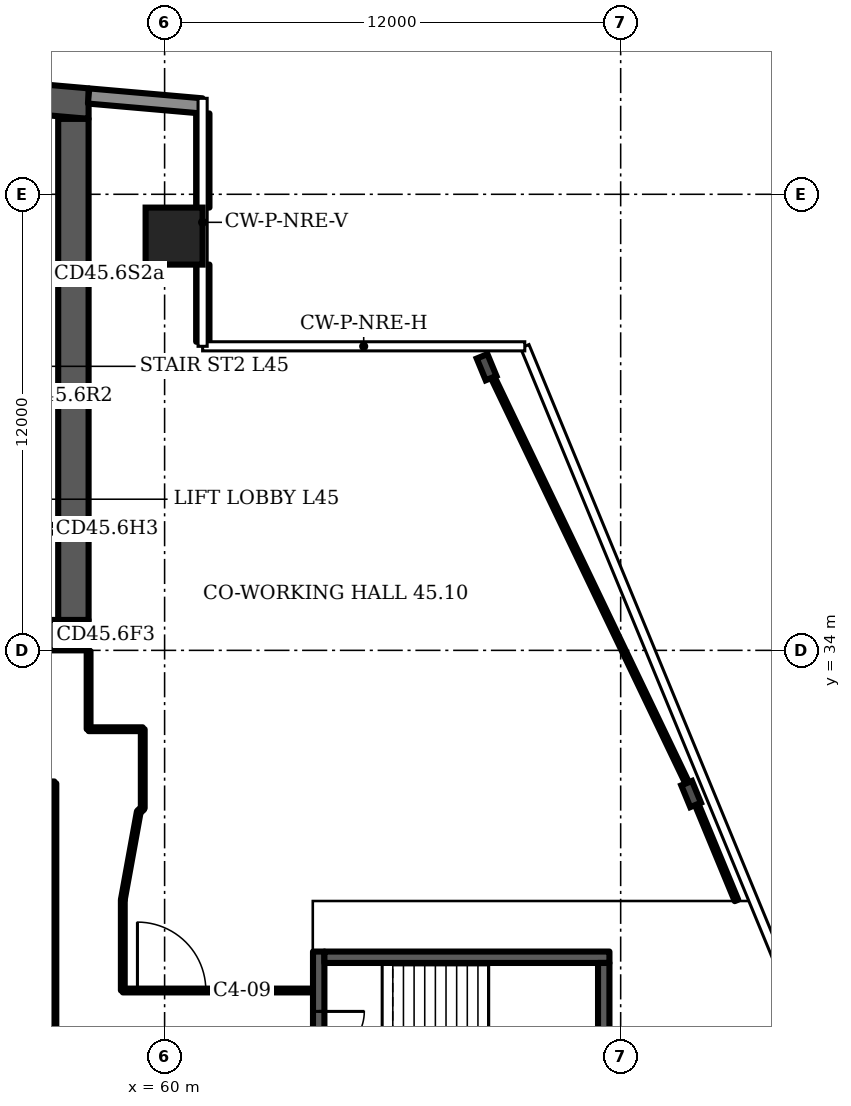
"""IFC4 building model, lengths in metres.
Left out: names, types, materials, properties, quantities, classifications, styles, units other than length and angle.
Written with IfcOpenShell. Run it as: python <this file> out.ifc"""

import sys

from ifc_helpers import new_model, si_unit, direction, frame, frame_2d, origin, origin_2d, place, context, subcontext, project, spatial, polyline, rectangle, i_section, outline, extrude, element, fill, save


model = new_model("IFC4")
c1 = context("Model", 3, precision=1e-05, world=origin(), true_north=direction((0.0, 1.0)))
c2 = subcontext(c1, "Body", "Model", "MODEL_VIEW")
j1 = project(units=[si_unit("LENGTHUNIT", "METRE"), si_unit("PLANEANGLEUNIT", "RADIAN")], contexts=[c1])
p1 = place(None, origin())
s1 = spatial("IfcSite", under=j1, at=p1, CompositionType="ELEMENT")
p2 = place(p1, origin())
s2 = spatial("IfcBuilding", under=s1, at=p2, CompositionType="ELEMENT")
p3 = place(p2, frame((0.0, 0.0, 184.3)))
s3 = spatial("IfcBuildingStorey", under=s2, at=p3, CompositionType="ELEMENT", Elevation=184.3)
p4 = place(p3, frame((0.0, 0.0, -0.0)))
e1 = element("IfcWall", 1, at=p4, inside=s3, PredefinedType="SHEAR", context=c2, shape_type="SweptSolid", body=[
    extrude(outline(polyline([(16.0, 47.984), (37.0, 49.822), (58.0, 47.984), (58.0, 48.787), (37.0, 50.625), (16.0, 48.787), (16.0, 47.984)])), origin(), (0.0, 0.0, 1.0), 3.6),
])
p5 = place(p3, frame((16.0, 34.4, 0.0), z_axis=(0.0, 0.0, 1.0), x_axis=(1.0, 0.0, 0.0)))
e2 = element("IfcWall", 2, at=p5, inside=s3, PredefinedType="SHEAR", context=c2, shape_type="SweptSolid", body=[
    extrude(rectangle(XDim=42.0, YDim=0.8, at=frame_2d((21.0, 0.0))), origin(), (0.0, 0.0, 1.0), 3.6),
])
p6 = place(p5, frame((1.75, 0.0, 0.0)))
e3 = element("IfcOpeningElement", 3, at=p6, cuts=e2, PredefinedType="OPENING", context=c2, shape_type="SweptSolid", body=[
    extrude(rectangle(XDim=1.0, YDim=2.1, at=frame_2d((0.5, 1.05))), frame((0.0, 0.41, 0.0), z_axis=(0.0, -1.0, 0.0), x_axis=(1.0, 0.0, 0.0)), (0.0, 0.0, 1.0), 0.82),
])
p7 = place(p5, frame((4.65, 0.0, 0.0)))
e4 = element("IfcOpeningElement", 4, at=p7, cuts=e2, PredefinedType="OPENING", context=c2, shape_type="SweptSolid", body=[
    extrude(rectangle(XDim=1.0, YDim=2.1, at=frame_2d((0.5, 1.05))), frame((0.0, 0.41, 0.0), z_axis=(0.0, -1.0, 0.0), x_axis=(1.0, 0.0, 0.0)), (0.0, 0.0, 1.0), 0.82),
])
p8 = place(p5, frame((7.65, 0.0, 0.0)))
e5 = element("IfcOpeningElement", 5, at=p8, cuts=e2, PredefinedType="OPENING", context=c2, shape_type="SweptSolid", body=[
    extrude(rectangle(XDim=1.2, YDim=2.1, at=frame_2d((0.6, 1.05))), frame((0.0, 0.41, 0.0), z_axis=(0.0, -1.0, 0.0), x_axis=(1.0, 0.0, 0.0)), (0.0, 0.0, 1.0), 0.82),
])
p9 = place(p5, frame((14.767, 0.0, 0.0)))
e6 = element("IfcOpeningElement", 6, at=p9, cuts=e2, PredefinedType="OPENING", context=c2, shape_type="SweptSolid", body=[
    extrude(rectangle(XDim=1.1, YDim=2.1, at=frame_2d((0.55, 1.05))), frame((0.0, 0.41, 0.0), z_axis=(0.0, -1.0, 0.0), x_axis=(1.0, 0.0, 0.0)), (0.0, 0.0, 1.0), 0.82),
])
p10 = place(p5, frame((19.133, 0.0, 0.0)))
e7 = element("IfcOpeningElement", 7, at=p10, cuts=e2, PredefinedType="OPENING", context=c2, shape_type="SweptSolid", body=[
    extrude(rectangle(XDim=1.1, YDim=2.1, at=frame_2d((0.55, 1.05))), frame((0.0, 0.41, 0.0), z_axis=(0.0, -1.0, 0.0), x_axis=(1.0, 0.0, 0.0)), (0.0, 0.0, 1.0), 0.82),
])
p11 = place(p5, frame((16.8, 0.0, 0.0)))
e8 = element("IfcOpeningElement", 8, at=p11, cuts=e2, PredefinedType="OPENING", context=c2, shape_type="SweptSolid", body=[
    extrude(rectangle(XDim=1.4, YDim=2.1, at=frame_2d((0.7, 1.05))), frame((0.0, 0.41, 0.0), z_axis=(0.0, -1.0, 0.0), x_axis=(1.0, 0.0, 0.0)), (0.0, 0.0, 1.0), 0.82),
])
p12 = place(p5, frame((21.767, 0.0, 0.0)))
e9 = element("IfcOpeningElement", 9, at=p12, cuts=e2, PredefinedType="OPENING", context=c2, shape_type="SweptSolid", body=[
    extrude(rectangle(XDim=1.1, YDim=2.1, at=frame_2d((0.55, 1.05))), frame((0.0, 0.41, 0.0), z_axis=(0.0, -1.0, 0.0), x_axis=(1.0, 0.0, 0.0)), (0.0, 0.0, 1.0), 0.82),
])
p13 = place(p5, frame((23.95, 0.0, 0.0)))
e10 = element("IfcOpeningElement", 10, at=p13, cuts=e2, PredefinedType="OPENING", context=c2, shape_type="SweptSolid", body=[
    extrude(rectangle(XDim=1.1, YDim=2.1, at=frame_2d((0.55, 1.05))), frame((0.0, 0.41, 0.0), z_axis=(0.0, -1.0, 0.0), x_axis=(1.0, 0.0, 0.0)), (0.0, 0.0, 1.0), 0.82),
])
p14 = place(p5, frame((26.133, 0.0, 0.0)))
e11 = element("IfcOpeningElement", 11, at=p14, cuts=e2, PredefinedType="OPENING", context=c2, shape_type="SweptSolid", body=[
    extrude(rectangle(XDim=1.1, YDim=2.1, at=frame_2d((0.55, 1.05))), frame((0.0, 0.41, 0.0), z_axis=(0.0, -1.0, 0.0), x_axis=(1.0, 0.0, 0.0)), (0.0, 0.0, 1.0), 0.82),
])
p15 = place(p5, frame((33.15, 0.0, 0.0)))
e12 = element("IfcOpeningElement", 12, at=p15, cuts=e2, PredefinedType="OPENING", context=c2, shape_type="SweptSolid", body=[
    extrude(rectangle(XDim=1.2, YDim=2.1, at=frame_2d((0.6, 1.05))), frame((0.0, 0.41, 0.0), z_axis=(0.0, -1.0, 0.0), x_axis=(1.0, 0.0, 0.0)), (0.0, 0.0, 1.0), 0.82),
])
p16 = place(p5, frame((35.817, 0.0, 0.0)))
e13 = element("IfcOpeningElement", 13, at=p16, cuts=e2, PredefinedType="OPENING", context=c2, shape_type="SweptSolid", body=[
    extrude(rectangle(XDim=1.0, YDim=2.1, at=frame_2d((0.5, 1.05))), frame((0.0, 0.41, 0.0), z_axis=(0.0, -1.0, 0.0), x_axis=(1.0, 0.0, 0.0)), (0.0, 0.0, 1.0), 0.82),
])
p17 = place(p5, frame((39.95, 0.0, 0.0)))
e14 = element("IfcOpeningElement", 14, at=p17, cuts=e2, PredefinedType="OPENING", context=c2, shape_type="SweptSolid", body=[
    extrude(rectangle(XDim=1.0, YDim=2.1, at=frame_2d((0.5, 1.05))), frame((0.0, 0.41, 0.0), z_axis=(0.0, -1.0, 0.0), x_axis=(1.0, 0.0, 0.0)), (0.0, 0.0, 1.0), 0.82),
])
p18 = place(p5, frame((37.767, 0.0, 0.0)))
e15 = element("IfcOpeningElement", 15, at=p18, cuts=e2, PredefinedType="OPENING", context=c2, shape_type="SweptSolid", body=[
    extrude(rectangle(XDim=1.4, YDim=2.1, at=frame_2d((0.7, 1.05))), frame((0.0, 0.41, 0.0), z_axis=(0.0, -1.0, 0.0), x_axis=(1.0, 0.0, 0.0)), (0.0, 0.0, 1.0), 0.82),
])
p19 = place(p3, frame((57.6, 34.8, 0.0), z_axis=(0.0, 0.0, 1.0), x_axis=(0.0, 1.0, 0.0)))
e16 = element("IfcWall", 16, at=p19, inside=s3, PredefinedType="SHEAR", context=c2, shape_type="SweptSolid", body=[
    extrude(rectangle(XDim=13.184, YDim=0.8, at=frame_2d((6.592, 0.0))), origin(), (0.0, 0.0, 1.0), 3.6),
])
p20 = place(p3, frame((60.25, 44.9, 0.0), z_axis=(0.0, 0.0, 1.0), x_axis=(1.0, 0.0, 0.0)))
e17 = element("IfcColumn", 17, at=p20, inside=s3, PredefinedType="COLUMN", context=c2, shape_type="SweptSolid", body=[
    extrude(rectangle(XDim=1.5, YDim=1.5, at=origin_2d()), origin(), (0.0, 0.0, 1.0), 3.6),
])
for number, where, z_axis, x_axis in (
    (18, (73.854, 30.219, 0.0), (0.0, 0.0, 1.0), (0.924, 0.382, 0.0)),
    (19, (68.472, 41.45, 0.0), (0.0, 0.0, 1.0), (0.924, 0.382, 0.0)),
):
    element("IfcColumn", number, at=place(p3, frame(where, z_axis=z_axis, x_axis=x_axis)), inside=s3, PredefinedType="COLUMN", context=c2, shape_type="SweptSolid", body=[
        extrude(i_section(OverallWidth=0.305, OverallDepth=0.62, WebThickness=0.021, FlangeThickness=0.04, FilletRadius=0.027, at=origin_2d()), origin(), (0.0, 0.0, 1.0), 3.6),
    ])
p21 = place(p3, frame((60.983, 48.326, 0.0), z_axis=(0.0, 0.0, 1.0), x_axis=(-0.996194, 0.087168, 0.0)))
e20 = element("IfcWall", 20, at=p21, inside=s3, PredefinedType="SOLIDWALL", context=c2, shape_type="SweptSolid", body=[
    extrude(rectangle(XDim=2.994, YDim=0.4, at=frame_2d((1.497, 0.0))), origin(), (0.0, 0.0, 1.0), 3.2),
])
p22 = place(p3, frame((61.005, 42.12, 0.0), z_axis=(0.0, 0.0, 1.0), x_axis=(0.0, 1.0, 0.0)))
e21 = element("IfcWall", 21, at=p22, inside=s3, PredefinedType="SOLIDWALL", context=c2, shape_type="SweptSolid", body=[
    extrude(rectangle(XDim=2.03, YDim=0.35, at=frame_2d((1.015, 0.0))), origin(), (0.0, 0.0, 1.0), 1.0),
])
p23 = place(p3, frame((61.005, 45.65, 0.0), z_axis=(0.0, 0.0, 1.0), x_axis=(0.0, 1.0, 0.0)))
e22 = element("IfcWall", 22, at=p23, inside=s3, PredefinedType="SOLIDWALL", context=c2, shape_type="SweptSolid", body=[
    extrude(rectangle(XDim=2.477, YDim=0.35, at=frame_2d((1.238, 0.0))), origin(), (0.0, 0.0, 1.0), 1.0),
])
p24 = place(p3, frame((55.7, 37.2, 0.0), z_axis=(0.0, 0.0, 1.0), x_axis=(1.0, 0.0, 0.0)))
e23 = element("IfcWall", 23, at=p24, inside=s3, PredefinedType="PARTITIONING", context=c2, shape_type="SweptSolid", body=[
    extrude(rectangle(XDim=1.5, YDim=0.2, at=frame_2d((0.75, 0.0))), origin(), (0.0, 0.0, 1.0), 3.2),
])
p25 = place(p24, frame((0.25, 0.0, 0.0)))
e24 = element("IfcOpeningElement", 24, at=p25, cuts=e23, PredefinedType="OPENING", context=c2, shape_type="SweptSolid", body=[
    extrude(rectangle(XDim=1.0, YDim=2.1, at=frame_2d((0.5, 1.05))), frame((0.0, 0.11, 0.0), z_axis=(0.0, -1.0, 0.0), x_axis=(1.0, 0.0, 0.0)), (0.0, 0.0, 1.0), 0.22),
])
p26 = place(p3, frame((51.4, 40.7, 0.0), z_axis=(0.0, 0.0, 1.0), x_axis=(1.0, 0.0, 0.0)))
e25 = element("IfcWall", 25, at=p26, inside=s3, PredefinedType="PARTITIONING", context=c2, shape_type="SweptSolid", body=[
    extrude(rectangle(XDim=5.8, YDim=0.2, at=frame_2d((2.9, 0.0))), origin(), (0.0, 0.0, 1.0), 3.2),
])
p27 = place(p26, frame((0.367, 0.0, 0.0)))
e26 = element("IfcOpeningElement", 26, at=p27, cuts=e25, PredefinedType="OPENING", context=c2, shape_type="SweptSolid", body=[
    extrude(rectangle(XDim=1.1, YDim=2.1, at=frame_2d((0.55, 1.05))), frame((0.0, 0.11, 0.0), z_axis=(0.0, -1.0, 0.0), x_axis=(1.0, 0.0, 0.0)), (0.0, 0.0, 1.0), 0.22),
])
p28 = place(p26, frame((3.417, 0.0, 0.0)))
e27 = element("IfcOpeningElement", 27, at=p28, cuts=e25, PredefinedType="OPENING", context=c2, shape_type="SweptSolid", body=[
    extrude(rectangle(XDim=1.0, YDim=2.1, at=frame_2d((0.5, 1.05))), frame((0.0, 0.11, 0.0), z_axis=(0.0, -1.0, 0.0), x_axis=(1.0, 0.0, 0.0)), (0.0, 0.0, 1.0), 0.22),
])
p29 = place(p3, frame((51.4, 43.9, 0.0), z_axis=(0.0, 0.0, 1.0), x_axis=(1.0, 0.0, 0.0)))
e28 = element("IfcWall", 28, at=p29, inside=s3, PredefinedType="PARTITIONING", context=c2, shape_type="SweptSolid", body=[
    extrude(rectangle(XDim=5.8, YDim=0.2, at=frame_2d((2.9, 0.0))), origin(), (0.0, 0.0, 1.0), 3.2),
])
p30 = place(p29, frame((2.617, 0.0, 0.0)))
e29 = element("IfcOpeningElement", 29, at=p30, cuts=e28, PredefinedType="OPENING", context=c2, shape_type="SweptSolid", body=[
    extrude(rectangle(XDim=1.0, YDim=2.1, at=frame_2d((0.5, 1.05))), frame((0.0, 0.11, 0.0), z_axis=(0.0, -1.0, 0.0), x_axis=(1.0, 0.0, 0.0)), (0.0, 0.0, 1.0), 0.22),
])
p31 = place(p29, frame((4.5, 0.0, 0.0)))
e30 = element("IfcOpeningElement", 30, at=p31, cuts=e28, PredefinedType="OPENING", context=c2, shape_type="SweptSolid", body=[
    extrude(rectangle(XDim=1.0, YDim=2.1, at=frame_2d((0.5, 1.05))), frame((0.0, 0.11, 0.0), z_axis=(0.0, -1.0, 0.0), x_axis=(1.0, 0.0, 0.0)), (0.0, 0.0, 1.0), 0.22),
])
p32 = place(p3, frame((64.055, 21.725, 0.0), z_axis=(0.0, 0.0, 1.0), x_axis=(0.0, 1.0, 0.0)))
e31 = element("IfcWall", 31, at=p32, inside=s3, PredefinedType="SHEAR", context=c2, shape_type="SweptSolid", body=[
    extrude(rectangle(XDim=4.35, YDim=0.3, at=frame_2d((2.175, 0.0))), origin(), (0.0, 0.0, 1.0), 3.2),
])
p33 = place(p32, frame((1.575, 0.0, 0.0)))
e32 = element("IfcOpeningElement", 32, at=p33, cuts=e31, PredefinedType="OPENING", context=c2, shape_type="SweptSolid", body=[
    extrude(rectangle(XDim=1.2, YDim=2.1, at=frame_2d((0.6, 1.05))), frame((0.0, 0.16, 0.0), z_axis=(0.0, -1.0, 0.0), x_axis=(1.0, 0.0, 0.0)), (0.0, 0.0, 1.0), 0.32),
])
p34 = place(p3, frame((57.1, 11.985, 0.0), z_axis=(0.0, 0.0, 1.0), x_axis=(0.0, 1.0, 0.0)))
e33 = element("IfcWall", 33, at=p34, inside=s3, PredefinedType="PARTITIONING", context=c2, shape_type="SweptSolid", body=[
    extrude(rectangle(XDim=18.515, YDim=0.1, at=frame_2d((9.257, 0.0))), origin(), (0.0, 0.0, 1.0), 3.2),
])
p35 = place(p34, frame((8.295, 0.0, 0.0)))
e34 = element("IfcOpeningElement", 34, at=p35, cuts=e33, PredefinedType="OPENING", context=c2, shape_type="SweptSolid", body=[
    extrude(rectangle(XDim=1.8, YDim=2.1, at=frame_2d((0.9, 1.05))), frame((0.0, 0.06, 0.0), z_axis=(0.0, -1.0, 0.0), x_axis=(1.0, 0.0, 0.0)), (0.0, 0.0, 1.0), 0.12),
])
p36 = place(p3, frame((58.0, 31.925, 0.0), z_axis=(0.0, 0.0, 1.0), x_axis=(0.0, 1.0, 0.0)))
e35 = element("IfcWall", 35, at=p36, inside=s3, PredefinedType="PARTITIONING", context=c2, shape_type="SweptSolid", body=[
    extrude(rectangle(XDim=2.055, YDim=0.1, at=frame_2d((1.027, 0.0))), origin(), (0.0, 0.0, 1.0), 3.2),
])
p37 = place(p3, frame((58.0, 31.925, 0.0), z_axis=(0.0, 0.0, 1.0), x_axis=(1.0, 0.0, 0.0)))
e36 = element("IfcWall", 36, at=p37, inside=s3, PredefinedType="PARTITIONING", context=c2, shape_type="SweptSolid", body=[
    extrude(rectangle(XDim=1.425, YDim=0.1, at=frame_2d((0.712, 0.0))), origin(), (0.0, 0.0, 1.0), 3.2),
])
p38 = place(p3, frame((58.9, 25.05, 0.0), z_axis=(0.0, 0.0, 1.0), x_axis=(0.0, 1.0, 0.0)))
e37 = element("IfcWall", 37, at=p38, inside=s3, PredefinedType="PARTITIONING", context=c2, shape_type="SweptSolid", body=[
    extrude(rectangle(XDim=2.385, YDim=0.1, at=frame_2d((1.192, 0.0))), origin(), (0.0, 0.0, 1.0), 3.2),
])
p39 = place(p3, frame((58.9, 25.05, 0.0), z_axis=(0.0, 0.0, 1.0), x_axis=(1.0, 0.0, 0.0)))
e38 = element("IfcWall", 38, at=p39, inside=s3, PredefinedType="PARTITIONING", context=c2, shape_type="SweptSolid", body=[
    extrude(rectangle(XDim=4.985, YDim=0.1, at=frame_2d((2.492, 0.0))), origin(), (0.0, 0.0, 1.0), 3.2),
])
p40 = place(p39, frame((0.385, 0.0, 0.0)))
e39 = element("IfcOpeningElement", 39, at=p40, cuts=e38, PredefinedType="OPENING", context=c2, shape_type="SweptSolid", body=[
    extrude(rectangle(XDim=1.8, YDim=2.1, at=frame_2d((0.9, 1.05))), frame((0.0, 0.06, 0.0), z_axis=(0.0, -1.0, 0.0), x_axis=(1.0, 0.0, 0.0)), (0.0, 0.0, 1.0), 0.12),
])
p41 = place(p3, frame((58.9, 27.435, 0.0), z_axis=(0.0, 0.0, 1.0), x_axis=(0.178584, 0.983924, 0.0)))
e40 = element("IfcWall", 40, at=p41, inside=s3, PredefinedType="PARTITIONING", context=c2, shape_type="SweptSolid", body=[
    extrude(rectangle(XDim=2.353, YDim=0.1, at=frame_2d((1.176, 0.0))), origin(), (0.0, 0.0, 1.0), 3.2),
])
p42 = place(p3, frame((59.32, 29.75, 0.0), z_axis=(0.0, 0.0, 1.0), x_axis=(0.741581, 0.670872, 0.0)))
e41 = element("IfcWall", 41, at=p42, inside=s3, PredefinedType="PARTITIONING", context=c2, shape_type="SweptSolid", body=[
    extrude(rectangle(XDim=0.142, YDim=0.1, at=frame_2d((0.071, 0.0))), origin(), (0.0, 0.0, 1.0), 3.2),
])
p43 = place(p3, frame((59.425, 29.845, 0.0), z_axis=(0.0, 0.0, 1.0), x_axis=(0.0, 1.0, 0.0)))
e42 = element("IfcWall", 42, at=p43, inside=s3, PredefinedType="PARTITIONING", context=c2, shape_type="SweptSolid", body=[
    extrude(rectangle(XDim=2.08, YDim=0.1, at=frame_2d((1.04, 0.0))), origin(), (0.0, 0.0, 1.0), 3.2),
])
p44 = place(p3, frame((73.885, 30.23, 0.0), z_axis=(0.0, 0.0, 1.0), x_axis=(-0.432221, 0.901772, 0.0)))
e43 = element("IfcWall", 43, at=p44, inside=s3, PredefinedType="PARTITIONING", context=c2, shape_type="SweptSolid", body=[
    extrude(rectangle(XDim=12.459, YDim=0.1, at=frame_2d((6.229, 0.0))), origin(), (0.0, 0.0, 1.0), 3.2),
])
p45 = place(p3, frame((75.047, 27.42, 0.0), z_axis=(0.0, 0.0, 1.0), x_axis=(-0.382024, 0.924148, 0.0)))
e44 = element("IfcWall", 44, at=p45, inside=s3, PredefinedType="PARTITIONING", context=c2, shape_type="SweptSolid", body=[
    extrude(rectangle(XDim=3.041, YDim=0.1, at=frame_2d((1.521, 0.0))), origin(), (0.0, 0.0, 1.0), 2.58),
])
p46 = place(p3, frame((44.15, 30.5, 0.0), z_axis=(0.0, 0.0, 1.0), x_axis=(1.0, 0.0, 0.0)))
e45 = element("IfcWall", 45, at=p46, inside=s3, PredefinedType="PARTITIONING", context=c2, shape_type="SweptSolid", body=[
    extrude(rectangle(XDim=12.95, YDim=0.1, at=frame_2d((6.475, 0.0))), origin(), (0.0, 0.0, 1.0), 3.2),
])
p47 = place(p46, frame((3.17, 0.0, 0.0)))
e46 = element("IfcOpeningElement", 46, at=p47, cuts=e45, PredefinedType="OPENING", context=c2, shape_type="SweptSolid", body=[
    extrude(rectangle(XDim=1.8, YDim=2.1, at=frame_2d((0.9, 1.05))), frame((0.0, 0.06, 0.0), z_axis=(0.0, -1.0, 0.0), x_axis=(1.0, 0.0, 0.0)), (0.0, 0.0, 1.0), 0.12),
])
p48 = place(p3, frame((64.205, 25.925, 0.0), z_axis=(0.0, 0.0, 1.0), x_axis=(1.0, 0.0, 0.0)))
e47 = element("IfcWall", 47, at=p48, inside=s3, PredefinedType="SHEAR", context=c2, shape_type="SweptSolid", body=[
    extrude(rectangle(XDim=7.5, YDim=0.3, at=frame_2d((3.75, 0.0))), origin(), (0.0, 0.0, 1.0), 3.2),
])
p49 = place(p3, frame((71.555, 22.025, 0.0), z_axis=(0.0, 0.0, 1.0), x_axis=(0.0, 1.0, 0.0)))
e48 = element("IfcWall", 48, at=p49, inside=s3, PredefinedType="SHEAR", context=c2, shape_type="SweptSolid", body=[
    extrude(rectangle(XDim=3.75, YDim=0.3, at=frame_2d((1.875, 0.0))), origin(), (0.0, 0.0, 1.0), 3.2),
])
p50 = place(p33, origin())
e49 = element("IfcDoor", 49, at=p50, inside=s3, OperationType="SINGLE_SWING_RIGHT", PredefinedType="DOOR", context=c2, shape_type="SweptSolid", body=[
    extrude(rectangle(XDim=1.2, YDim=2.1, at=frame_2d((0.6, 1.05))), frame((0.0, 0.025, 0.0), z_axis=(0.0, -1.0, 0.0), x_axis=(1.0, 0.0, 0.0)), (0.0, 0.0, 1.0), 0.05),
])
fill(e32, e49)
p51 = place(p40, origin())
e50 = element("IfcDoor", 50, at=p51, inside=s3, OperationType="DOUBLE_DOOR_SINGLE_SWING", PredefinedType="DOOR", context=c2, shape_type="SweptSolid", body=[
    extrude(rectangle(XDim=1.8, YDim=2.1, at=frame_2d((0.9, 1.05))), frame((0.0, 0.025, 0.0), z_axis=(0.0, -1.0, 0.0), x_axis=(1.0, 0.0, 0.0)), (0.0, 0.0, 1.0), 0.05),
])
fill(e39, e50)
save(model, sys.argv[1])
